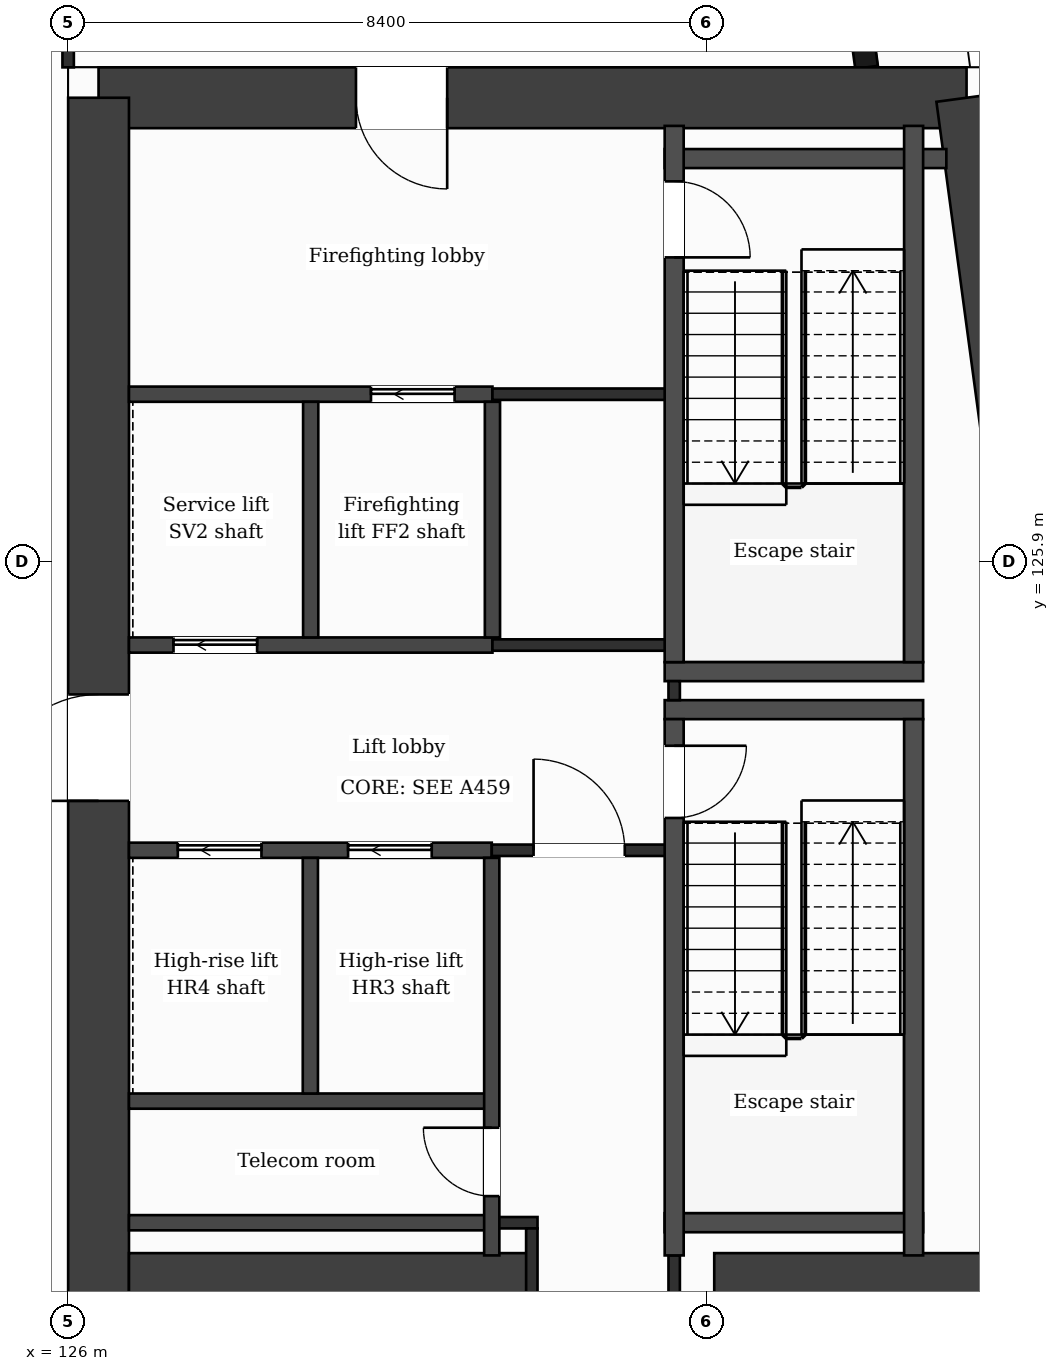
"""IFC4 building model, lengths in metres.
Left out: names, types, materials, properties, quantities, classifications, styles, units other than length and angle.
Written with IfcOpenShell. Run it as: python <this file> out.ifc"""

import sys

from ifc_helpers import new_model, si_unit, direction, frame, frame_2d, origin, place, context, subcontext, project, spatial, rectangle, extrude, element, fill, save


model = new_model("IFC4")
c1 = context("Model", 3, precision=1e-05, world=origin(), true_north=direction((0.0, 1.0)))
c2 = subcontext(c1, "Body", "Model", "MODEL_VIEW")
j1 = project(units=[si_unit("LENGTHUNIT", "METRE"), si_unit("PLANEANGLEUNIT", "RADIAN")], contexts=[c1])
p1 = place(None, origin())
s1 = spatial("IfcSite", under=j1, at=p1, CompositionType="ELEMENT")
p2 = place(p1, origin())
s2 = spatial("IfcBuilding", under=s1, at=p2, CompositionType="ELEMENT")
p3 = place(p2, frame((0.0, 0.0, 239.2)))
s3 = spatial("IfcBuildingStorey", under=s2, at=p3, CompositionType="ELEMENT", Elevation=239.2)
p4 = place(p3, frame((126.4, 132.0, 0.0), z_axis=(0.0, 0.0, 1.0), x_axis=(1.0, 0.0, 0.0)))
e1 = element("IfcWall", 1, at=p4, inside=s3, PredefinedType="SHEAR", context=c2, shape_type="SweptSolid", body=[
    extrude(rectangle(XDim=11.42, YDim=0.8, at=frame_2d((5.71, 0.0))), origin(), (0.0, 0.0, 1.0), 3.7),
])
p5 = place(p4, frame((3.386, 0.0, 0.0)))
e2 = element("IfcOpeningElement", 2, at=p5, cuts=e1, PredefinedType="OPENING", context=c2, shape_type="SweptSolid", body=[
    extrude(rectangle(XDim=1.2, YDim=2.1, at=frame_2d((0.6, 1.05))), frame((0.0, 0.41, 0.0), z_axis=(0.0, -1.0, 0.0), x_axis=(1.0, 0.0, 0.0)), (0.0, 0.0, 1.0), 0.82),
])
p6 = place(p3, frame((137.82, 132.0, 0.0), z_axis=(0.0, 0.0, 1.0), x_axis=(0.133408347329, -0.991061154956, 0.0)))
e3 = element("IfcWall", 3, at=p6, inside=s3, PredefinedType="SHEAR", context=c2, shape_type="SweptSolid", body=[
    extrude(rectangle(XDim=21.391, YDim=0.8, at=frame_2d((10.696, 0.0))), origin(), (0.0, 0.0, 1.0), 3.7),
])
p7 = place(p3, frame((126.4, 110.8, 0.0), z_axis=(0.0, 0.0, 1.0), x_axis=(0.0, 1.0, 0.0)))
e4 = element("IfcWall", 4, at=p7, inside=s3, PredefinedType="SHEAR", context=c2, shape_type="SweptSolid", body=[
    extrude(rectangle(XDim=21.2, YDim=0.8, at=frame_2d((10.6, 0.0))), origin(), (0.0, 0.0, 1.0), 3.7),
])
p8 = place(p7, frame((11.95, 0.0, 0.0)))
e5 = element("IfcOpeningElement", 5, at=p8, cuts=e4, PredefinedType="OPENING", context=c2, shape_type="SweptSolid", body=[
    extrude(rectangle(XDim=1.4, YDim=2.1, at=frame_2d((0.7, 1.05))), frame((0.0, 0.41, 0.0), z_axis=(0.0, -1.0, 0.0), x_axis=(1.0, 0.0, 0.0)), (0.0, 0.0, 1.0), 0.82),
])
p9 = place(p3, frame((126.8, 116.4, 0.0), z_axis=(0.0, 0.0, 1.0), x_axis=(1.0, 0.0, 0.0)))
e6 = element("IfcWall", 6, at=p9, inside=s3, PredefinedType="SHEAR", context=c2, shape_type="SweptSolid", body=[
    extrude(rectangle(XDim=5.3, YDim=0.8, at=frame_2d((2.65, 0.0))), origin(), (0.0, 0.0, 1.0), 3.7),
])
p10 = place(p3, frame((134.5, 116.4, 0.0), z_axis=(0.0, 0.0, 1.0), x_axis=(1.0, 0.0, 0.0)))
e7 = element("IfcWall", 7, at=p10, inside=s3, PredefinedType="SHEAR", context=c2, shape_type="SweptSolid", body=[
    extrude(rectangle(XDim=5.077, YDim=0.8, at=frame_2d((2.539, 0.0))), origin(), (0.0, 0.0, 1.0), 3.7),
])
p11 = place(p3, frame((136.504, 132.4, 0.0), z_axis=(0.0, 0.0, 1.0), x_axis=(-0.133399697462, 0.99106231929, 0.0)))
e8 = element("IfcWall", 8, at=p11, inside=s3, PredefinedType="SOLIDWALL", context=c2, shape_type="SweptSolid", body=[
    extrude(rectangle(XDim=6.74, YDim=0.3, at=frame_2d((3.37, 0.0))), origin(), (0.0, 0.0, 1.0), 3.38),
])
p12 = place(p11, frame((1.115, 0.0, 0.0)))
e9 = element("IfcOpeningElement", 9, at=p12, cuts=e8, PredefinedType="OPENING", context=c2, shape_type="SweptSolid", body=[
    extrude(rectangle(XDim=1.2, YDim=2.4, at=frame_2d((0.6, 1.2))), frame((0.0, 0.16, 0.0), z_axis=(0.0, -1.0, 0.0), x_axis=(1.0, 0.0, 0.0)), (0.0, 0.0, 1.0), 0.32),
])
p13 = place(p11, frame((3.835, 0.0, 0.9)))
e10 = element("IfcOpeningElement", 10, at=p13, cuts=e8, PredefinedType="OPENING", context=c2, shape_type="SweptSolid", body=[
    extrude(rectangle(XDim=2.4, YDim=2.1, at=frame_2d((1.2, 1.05))), frame((0.0, 0.16, 0.0), z_axis=(0.0, -1.0, 0.0), x_axis=(1.0, 0.0, 0.0)), (0.0, 0.0, 1.0), 0.32),
])
p14 = place(p3, frame((126.8, 117.2, 0.0), z_axis=(0.0, 0.0, 1.0), x_axis=(1.0, 0.0, 0.0)))
e11 = element("IfcWall", 11, at=p14, inside=s3, PredefinedType="PARTITIONING", context=c2, shape_type="SweptSolid", body=[
    extrude(rectangle(XDim=4.773, YDim=0.2, at=frame_2d((2.386, 0.0))), origin(), (0.0, 0.0, 1.0), 3.38),
])
p15 = place(p3, frame((131.573, 117.2, 0.0), z_axis=(0.0, 0.0, 1.0), x_axis=(1.0, 0.0, 0.0)))
e12 = element("IfcWall", 12, at=p15, inside=s3, PredefinedType="PARTITIONING", context=c2, shape_type="SweptSolid", body=[
    extrude(rectangle(XDim=0.602, YDim=0.15, at=frame_2d((0.301, 0.0))), origin(), (0.0, 0.0, 1.0), 3.38),
])
p16 = place(p3, frame((133.848, 117.2, 0.0), z_axis=(0.0, 0.0, 1.0), x_axis=(1.0, 0.0, 0.0)))
e13 = element("IfcWall", 13, at=p16, inside=s3, PredefinedType="PARTITIONING", context=c2, shape_type="SweptSolid", body=[
    extrude(rectangle(XDim=3.4, YDim=0.25, at=frame_2d((1.7, 0.0))), origin(), (0.0, 0.0, 1.0), 3.38),
])
p17 = place(p3, frame((126.8, 118.8, 0.0), z_axis=(0.0, 0.0, 1.0), x_axis=(1.0, 0.0, 0.0)))
e14 = element("IfcWall", 14, at=p17, inside=s3, PredefinedType="PARTITIONING", context=c2, shape_type="SweptSolid", body=[
    extrude(rectangle(XDim=4.773, YDim=0.2, at=frame_2d((2.386, 0.0))), origin(), (0.0, 0.0, 1.0), 3.38),
])
p18 = place(p3, frame((126.8, 122.1, 0.0), z_axis=(0.0, 0.0, 1.0), x_axis=(1.0, 0.0, 0.0)))
e15 = element("IfcWall", 15, at=p18, inside=s3, PredefinedType="PARTITIONING", context=c2, shape_type="SweptSolid", body=[
    extrude(rectangle(XDim=4.773, YDim=0.2, at=frame_2d((2.386, 0.0))), origin(), (0.0, 0.0, 1.0), 3.38),
])
p19 = place(p18, frame((2.883, 0.0, 0.0)))
e16 = element("IfcOpeningElement", 16, at=p19, cuts=e15, PredefinedType="OPENING", context=c2, shape_type="SweptSolid", body=[
    extrude(rectangle(XDim=1.1, YDim=2.1, at=frame_2d((0.55, 1.05))), frame((0.0, 0.11, 0.0), z_axis=(0.0, -1.0, 0.0), x_axis=(1.0, 0.0, 0.0)), (0.0, 0.0, 1.0), 0.22),
])
p20 = place(p18, frame((0.643, 0.0, 0.0)))
e17 = element("IfcOpeningElement", 17, at=p20, cuts=e15, PredefinedType="OPENING", context=c2, shape_type="SweptSolid", body=[
    extrude(rectangle(XDim=1.1, YDim=2.1, at=frame_2d((0.55, 1.05))), frame((0.0, 0.11, 0.0), z_axis=(0.0, -1.0, 0.0), x_axis=(1.0, 0.0, 0.0)), (0.0, 0.0, 1.0), 0.22),
])
p21 = place(p3, frame((131.573, 122.1, 0.0), z_axis=(0.0, 0.0, 1.0), x_axis=(1.0, 0.0, 0.0)))
e18 = element("IfcWall", 18, at=p21, inside=s3, PredefinedType="PARTITIONING", context=c2, shape_type="SweptSolid", body=[
    extrude(rectangle(XDim=2.4, YDim=0.15, at=frame_2d((1.2, 0.0))), origin(), (0.0, 0.0, 1.0), 3.38),
])
p22 = place(p21, frame((0.55, 0.0, 0.0)))
e19 = element("IfcOpeningElement", 19, at=p22, cuts=e18, PredefinedType="OPENING", context=c2, shape_type="SweptSolid", body=[
    extrude(rectangle(XDim=1.2, YDim=2.1, at=frame_2d((0.6, 1.05))), frame((0.0, 0.085, 0.0), z_axis=(0.0, -1.0, 0.0), x_axis=(1.0, 0.0, 0.0)), (0.0, 0.0, 1.0), 0.17),
])
for number, where, z_axis, x_axis in (
    (20, (133.848, 123.95, 0.0), (0.0, 0.0, 1.0), (1.0, 0.0, 0.0)),
    (21, (133.848, 124.45, 0.0), (0.0, 0.0, 1.0), (1.0, 0.0, 0.0)),
):
    element("IfcWall", number, at=place(p3, frame(where, z_axis=z_axis, x_axis=x_axis)), inside=s3, PredefinedType="PARTITIONING", context=c2, shape_type="SweptSolid", body=[
        extrude(rectangle(XDim=3.4, YDim=0.25, at=frame_2d((1.7, 0.0))), origin(), (0.0, 0.0, 1.0), 3.38),
    ])
p23 = place(p3, frame((126.8, 124.8, 0.0), z_axis=(0.0, 0.0, 1.0), x_axis=(1.0, 0.0, 0.0)))
e22 = element("IfcWall", 22, at=p23, inside=s3, PredefinedType="PARTITIONING", context=c2, shape_type="SweptSolid", body=[
    extrude(rectangle(XDim=4.782, YDim=0.2, at=frame_2d((2.391, 0.0))), origin(), (0.0, 0.0, 1.0), 3.38),
])
p24 = place(p23, frame((0.586, 0.0, 0.0)))
e23 = element("IfcOpeningElement", 23, at=p24, cuts=e22, PredefinedType="OPENING", context=c2, shape_type="SweptSolid", body=[
    extrude(rectangle(XDim=1.1, YDim=2.1, at=frame_2d((0.55, 1.05))), frame((0.0, 0.11, 0.0), z_axis=(0.0, -1.0, 0.0), x_axis=(1.0, 0.0, 0.0)), (0.0, 0.0, 1.0), 0.22),
])
p25 = place(p3, frame((131.582, 124.8, 0.0), z_axis=(0.0, 0.0, 1.0), x_axis=(1.0, 0.0, 0.0)))
e24 = element("IfcWall", 24, at=p25, inside=s3, PredefinedType="PARTITIONING", context=c2, shape_type="SweptSolid", body=[
    extrude(rectangle(XDim=2.516, YDim=0.15, at=frame_2d((1.258, 0.0))), origin(), (0.0, 0.0, 1.0), 3.38),
])
p26 = place(p3, frame((126.8, 128.1, 0.0), z_axis=(0.0, 0.0, 1.0), x_axis=(1.0, 0.0, 0.0)))
e25 = element("IfcWall", 25, at=p26, inside=s3, PredefinedType="PARTITIONING", context=c2, shape_type="SweptSolid", body=[
    extrude(rectangle(XDim=4.782, YDim=0.2, at=frame_2d((2.391, 0.0))), origin(), (0.0, 0.0, 1.0), 3.38),
])
p27 = place(p26, frame((3.184, 0.0, 0.0)))
e26 = element("IfcOpeningElement", 26, at=p27, cuts=e25, PredefinedType="OPENING", context=c2, shape_type="SweptSolid", body=[
    extrude(rectangle(XDim=1.1, YDim=2.1, at=frame_2d((0.55, 1.05))), frame((0.0, 0.11, 0.0), z_axis=(0.0, -1.0, 0.0), x_axis=(1.0, 0.0, 0.0)), (0.0, 0.0, 1.0), 0.22),
])
p28 = place(p3, frame((131.582, 128.1, 0.0), z_axis=(0.0, 0.0, 1.0), x_axis=(1.0, 0.0, 0.0)))
e27 = element("IfcWall", 27, at=p28, inside=s3, PredefinedType="PARTITIONING", context=c2, shape_type="SweptSolid", body=[
    extrude(rectangle(XDim=2.391, YDim=0.15, at=frame_2d((1.195, 0.0))), origin(), (0.0, 0.0, 1.0), 3.38),
])
p29 = place(p3, frame((133.848, 131.2, 0.0), z_axis=(0.0, 0.0, 1.0), x_axis=(1.0, 0.0, 0.0)))
e28 = element("IfcWall", 28, at=p29, inside=s3, PredefinedType="PARTITIONING", context=c2, shape_type="SweptSolid", body=[
    extrude(rectangle(XDim=3.706, YDim=0.25, at=frame_2d((1.853, 0.0))), origin(), (0.0, 0.0, 1.0), 3.38),
])
p30 = place(p3, frame((126.0, 132.4, 0.0), z_axis=(0.0, 0.0, 1.0), x_axis=(0.0, 1.0, 0.0)))
e29 = element("IfcWall", 29, at=p30, inside=s3, PredefinedType="PARTITIONING", context=c2, shape_type="SweptSolid", body=[
    extrude(rectangle(XDim=1.325, YDim=0.15, at=frame_2d((0.663, 0.0))), origin(), (0.0, 0.0, 1.0), 3.38),
])
for number, where, z_axis, x_axis in (
    (30, (129.187, 118.9, 0.0), (0.0, 0.0, 1.0), (0.0, 1.0, 0.0)),
    (31, (129.191, 124.9, 0.0), (0.0, 0.0, 1.0), (0.0, 1.0, 0.0)),
):
    element("IfcWall", number, at=place(p3, frame(where, z_axis=z_axis, x_axis=x_axis)), inside=s3, PredefinedType="PARTITIONING", context=c2, shape_type="SweptSolid", body=[
        extrude(rectangle(XDim=3.1, YDim=0.2, at=frame_2d((1.55, 0.0))), origin(), (0.0, 0.0, 1.0), 3.38),
    ])
p31 = place(p3, frame((131.573, 116.77, 0.0), z_axis=(0.0, 0.0, 1.0), x_axis=(0.0, 1.0, 0.0)))
e32 = element("IfcWall", 32, at=p31, inside=s3, PredefinedType="PARTITIONING", context=c2, shape_type="SweptSolid", body=[
    extrude(rectangle(XDim=5.23, YDim=0.2, at=frame_2d((2.615, 0.0))), origin(), (0.0, 0.0, 1.0), 3.38),
])
p32 = place(p31, frame((0.78, 0.0, 0.0)))
e33 = element("IfcOpeningElement", 33, at=p32, cuts=e32, PredefinedType="OPENING", context=c2, shape_type="SweptSolid", body=[
    extrude(rectangle(XDim=0.9, YDim=2.1, at=frame_2d((0.45, 1.05))), frame((0.0, 0.11, 0.0), z_axis=(0.0, -1.0, 0.0), x_axis=(1.0, 0.0, 0.0)), (0.0, 0.0, 1.0), 0.22),
])
p33 = place(p3, frame((131.582, 124.9, 0.0), z_axis=(0.0, 0.0, 1.0), x_axis=(0.0, 1.0, 0.0)))
e34 = element("IfcWall", 34, at=p33, inside=s3, PredefinedType="PARTITIONING", context=c2, shape_type="SweptSolid", body=[
    extrude(rectangle(XDim=3.1, YDim=0.2, at=frame_2d((1.55, 0.0))), origin(), (0.0, 0.0, 1.0), 3.38),
])
p34 = place(p3, frame((132.1, 116.0, 0.0), z_axis=(0.0, 0.0, 1.0), x_axis=(0.0, 1.0, 0.0)))
e35 = element("IfcWall", 35, at=p34, inside=s3, PredefinedType="PARTITIONING", context=c2, shape_type="SweptSolid", body=[
    extrude(rectangle(XDim=1.125, YDim=0.15, at=frame_2d((0.562, 0.0))), origin(), (0.0, 0.0, 1.0), 3.38),
])
p35 = place(p3, frame((133.973, 116.0, 0.0), z_axis=(0.0, 0.0, 1.0), x_axis=(0.0, 1.0, 0.0)))
e36 = element("IfcWall", 36, at=p35, inside=s3, PredefinedType="PARTITIONING", context=c2, shape_type="SweptSolid", body=[
    extrude(rectangle(XDim=0.77, YDim=0.15, at=frame_2d((0.385, 0.0))), origin(), (0.0, 0.0, 1.0), 3.38),
])
p36 = place(p3, frame((133.973, 124.075, 0.0), z_axis=(0.0, 0.0, 1.0), x_axis=(0.0, 1.0, 0.0)))
e37 = element("IfcWall", 37, at=p36, inside=s3, PredefinedType="PARTITIONING", context=c2, shape_type="SweptSolid", body=[
    extrude(rectangle(XDim=0.25, YDim=0.15, at=frame_2d((0.125, 0.0))), origin(), (0.0, 0.0, 1.0), 3.38),
])
p37 = place(p3, frame((133.973, 116.77, 0.0), z_axis=(0.0, 0.0, 1.0), x_axis=(0.0, 1.0, 0.0)))
e38 = element("IfcWall", 38, at=p37, inside=s3, PredefinedType="PARTITIONING", context=c2, shape_type="SweptSolid", body=[
    extrude(rectangle(XDim=7.055, YDim=0.25, at=frame_2d((3.527, 0.0))), origin(), (0.0, 0.0, 1.0), 3.38),
])
p38 = place(p37, frame((5.755, 0.0, 0.0)))
e39 = element("IfcOpeningElement", 39, at=p38, cuts=e38, PredefinedType="OPENING", context=c2, shape_type="SweptSolid", body=[
    extrude(rectangle(XDim=0.95, YDim=2.1, at=frame_2d((0.475, 1.05))), frame((0.0, 0.135, 0.0), z_axis=(0.0, -1.0, 0.0), x_axis=(1.0, 0.0, 0.0)), (0.0, 0.0, 1.0), 0.27),
])
p39 = place(p3, frame((133.973, 124.575, 0.0), z_axis=(0.0, 0.0, 1.0), x_axis=(0.0, 1.0, 0.0)))
e40 = element("IfcWall", 40, at=p39, inside=s3, PredefinedType="PARTITIONING", context=c2, shape_type="SweptSolid", body=[
    extrude(rectangle(XDim=7.055, YDim=0.25, at=frame_2d((3.527, 0.0))), origin(), (0.0, 0.0, 1.0), 3.38),
])
p40 = place(p39, frame((5.325, 0.0, 0.0)))
e41 = element("IfcOpeningElement", 41, at=p40, cuts=e40, PredefinedType="OPENING", context=c2, shape_type="SweptSolid", body=[
    extrude(rectangle(XDim=1.0, YDim=2.1, at=frame_2d((0.5, 1.05))), frame((0.0, 0.135, 0.0), z_axis=(0.0, -1.0, 0.0), x_axis=(1.0, 0.0, 0.0)), (0.0, 0.0, 1.0), 0.27),
])
for number, where, z_axis, x_axis in (
    (42, (137.123, 116.77, 0.0), (0.0, 0.0, 1.0), (0.0, 1.0, 0.0)),
    (43, (137.123, 124.575, 0.0), (0.0, 0.0, 1.0), (0.0, 1.0, 0.0)),
):
    element("IfcWall", number, at=place(p3, frame(where, z_axis=z_axis, x_axis=x_axis)), inside=s3, PredefinedType="PARTITIONING", context=c2, shape_type="SweptSolid", body=[
        extrude(rectangle(XDim=7.055, YDim=0.25, at=frame_2d((3.527, 0.0))), origin(), (0.0, 0.0, 1.0), 3.38),
    ])
p41 = place(p22, origin())
e44 = element("IfcDoor", 44, at=p41, inside=s3, OperationType="SINGLE_SWING_LEFT", PredefinedType="DOOR", context=c2, shape_type="SweptSolid", body=[
    extrude(rectangle(XDim=1.2, YDim=2.1, at=frame_2d((0.6, 1.05))), frame((0.0, 0.025, 0.0), z_axis=(0.0, -1.0, 0.0), x_axis=(1.0, 0.0, 0.0)), (0.0, 0.0, 1.0), 0.05),
])
fill(e19, e44)
p42 = place(p19, origin())
e45 = element("IfcDoor", 45, at=p42, inside=s3, OperationType="SLIDING_TO_LEFT", PredefinedType="DOOR", context=c2, shape_type="SweptSolid", body=[
    extrude(rectangle(XDim=1.1, YDim=2.1, at=frame_2d((0.55, 1.05))), frame((0.0, 0.025, 0.0), z_axis=(0.0, -1.0, 0.0), x_axis=(1.0, 0.0, 0.0)), (0.0, 0.0, 1.0), 0.05),
])
fill(e16, e45)
p43 = place(p20, origin())
e46 = element("IfcDoor", 46, at=p43, inside=s3, OperationType="SLIDING_TO_LEFT", PredefinedType="DOOR", context=c2, shape_type="SweptSolid", body=[
    extrude(rectangle(XDim=1.1, YDim=2.1, at=frame_2d((0.55, 1.05))), frame((0.0, 0.025, 0.0), z_axis=(0.0, -1.0, 0.0), x_axis=(1.0, 0.0, 0.0)), (0.0, 0.0, 1.0), 0.05),
])
fill(e17, e46)
p44 = place(p27, origin())
e47 = element("IfcDoor", 47, at=p44, inside=s3, OperationType="SLIDING_TO_LEFT", PredefinedType="DOOR", context=c2, shape_type="SweptSolid", body=[
    extrude(rectangle(XDim=1.1, YDim=2.1, at=frame_2d((0.55, 1.05))), frame((0.0, 0.025, 0.0), z_axis=(0.0, -1.0, 0.0), x_axis=(1.0, 0.0, 0.0)), (0.0, 0.0, 1.0), 0.05),
])
fill(e26, e47)
p45 = place(p24, origin())
e48 = element("IfcDoor", 48, at=p45, inside=s3, OperationType="SLIDING_TO_LEFT", PredefinedType="DOOR", context=c2, shape_type="SweptSolid", body=[
    extrude(rectangle(XDim=1.1, YDim=2.1, at=frame_2d((0.55, 1.05))), frame((0.0, 0.025, 0.0), z_axis=(0.0, -1.0, 0.0), x_axis=(1.0, 0.0, 0.0)), (0.0, 0.0, 1.0), 0.05),
])
fill(e23, e48)
p46 = place(p38, origin())
e49 = element("IfcDoor", 49, at=p46, inside=s3, OperationType="SINGLE_SWING_RIGHT", PredefinedType="DOOR", context=c2, shape_type="SweptSolid", body=[
    extrude(rectangle(XDim=0.95, YDim=2.1, at=frame_2d((0.475, 1.05))), frame((0.0, 0.025, 0.0), z_axis=(0.0, -1.0, 0.0), x_axis=(1.0, 0.0, 0.0)), (0.0, 0.0, 1.0), 0.05),
])
fill(e39, e49)
p47 = place(p40, origin())
e50 = element("IfcDoor", 50, at=p47, inside=s3, OperationType="SINGLE_SWING_LEFT", PredefinedType="DOOR", context=c2, shape_type="SweptSolid", body=[
    extrude(rectangle(XDim=1.0, YDim=2.1, at=frame_2d((0.5, 1.05))), frame((0.0, 0.025, 0.0), z_axis=(0.0, -1.0, 0.0), x_axis=(1.0, 0.0, 0.0)), (0.0, 0.0, 1.0), 0.05),
])
fill(e41, e50)
p48 = place(p32, origin())
e51 = element("IfcDoor", 51, at=p48, inside=s3, OperationType="SINGLE_SWING_RIGHT", PredefinedType="DOOR", context=c2, shape_type="SweptSolid", body=[
    extrude(rectangle(XDim=0.9, YDim=2.1, at=frame_2d((0.45, 1.05))), frame((0.0, 0.025, 0.0), z_axis=(0.0, -1.0, 0.0), x_axis=(1.0, 0.0, 0.0)), (0.0, 0.0, 1.0), 0.05),
])
fill(e33, e51)
p49 = place(p5, origin())
e52 = element("IfcDoor", 52, at=p49, inside=s3, OperationType="SINGLE_SWING_RIGHT", PredefinedType="DOOR", context=c2, shape_type="SweptSolid", body=[
    extrude(rectangle(XDim=1.2, YDim=2.1, at=frame_2d((0.6, 1.05))), frame((0.0, 0.025, 0.0), z_axis=(0.0, -1.0, 0.0), x_axis=(1.0, 0.0, 0.0)), (0.0, 0.0, 1.0), 0.05),
])
fill(e2, e52)
p50 = place(p8, origin())
e53 = element("IfcDoor", 53, at=p50, inside=s3, OperationType="SINGLE_SWING_LEFT", PredefinedType="DOOR", context=c2, shape_type="SweptSolid", body=[
    extrude(rectangle(XDim=1.4, YDim=2.1, at=frame_2d((0.7, 1.05))), frame((0.0, 0.025, 0.0), z_axis=(0.0, -1.0, 0.0), x_axis=(1.0, 0.0, 0.0)), (0.0, 0.0, 1.0), 0.05),
])
fill(e5, e53)
save(model, sys.argv[1])
